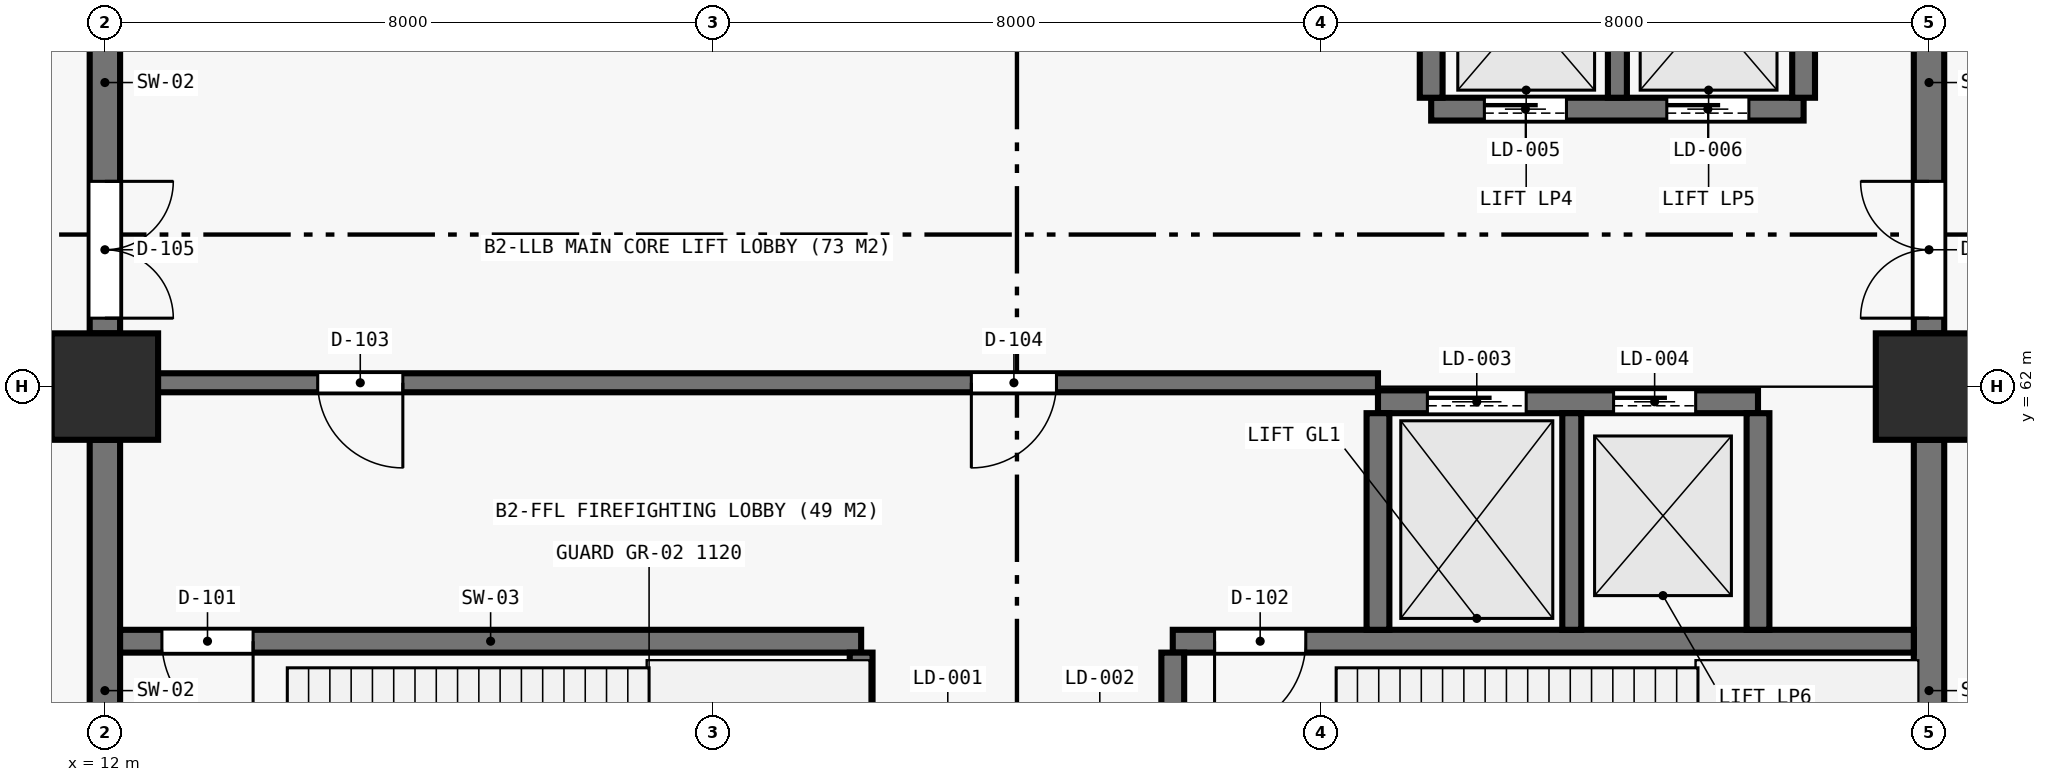
"""IFC4 building model, lengths in metres.
Left out: names, types, materials, properties, quantities, classifications, styles, units other than length and angle.
Written with IfcOpenShell. Run it as: python <this file> out.ifc"""

import sys

from ifc_helpers import new_model, si_unit, direction, frame, frame_2d, origin, origin_2d, place, context, subcontext, project, spatial, rectangle, extrude, element, fill, save


model = new_model("IFC4")
c1 = context("Model", 3, precision=1e-05, world=origin(), true_north=direction((0.0, 1.0)))
c2 = subcontext(c1, "Body", "Model", "MODEL_VIEW")
j1 = project(units=[si_unit("LENGTHUNIT", "METRE"), si_unit("PLANEANGLEUNIT", "RADIAN")], contexts=[c1])
p1 = place(None, origin())
s1 = spatial("IfcSite", under=j1, at=p1, CompositionType="ELEMENT")
p2 = place(p1, origin())
s2 = spatial("IfcBuilding", under=s1, at=p2, CompositionType="ELEMENT")
p3 = place(p2, frame((0.0, 0.0, -12.6)))
s3 = spatial("IfcBuildingStorey", under=s2, at=p3, CompositionType="ELEMENT", Elevation=-12.6)
for number, where, z_axis, x_axis in (
    (1, (12.0, 62.0, 0.0), (0.0, 0.0, 1.0), (1.0, 0.0, 0.0)),
    (2, (36.0, 62.0, 0.0), (0.0, 0.0, 1.0), (1.0, 0.0, 0.0)),
):
    element("IfcColumn", number, at=place(p3, frame(where, z_axis=z_axis, x_axis=x_axis)), inside=s3, PredefinedType="COLUMN", context=c2, shape_type="SweptSolid", body=[
        extrude(rectangle(XDim=1.4, YDim=1.4, at=origin_2d()), origin(), (0.0, 0.0, 1.0), 5.9),
    ])
p4 = place(p3, frame((12.0, 54.7, 0.0), z_axis=(0.0, 0.0, 1.0), x_axis=(0.0, 1.0, 0.0)))
e3 = element("IfcWall", 3, at=p4, inside=s3, PredefinedType="SHEAR", context=c2, shape_type="SweptSolid", body=[
    extrude(rectangle(XDim=6.6, YDim=0.4, at=frame_2d((3.3, 0.0))), origin(), (0.0, 0.0, 1.0), 5.9),
])
p5 = place(p3, frame((12.0, 62.7, 0.0), z_axis=(0.0, 0.0, 1.0), x_axis=(0.0, 1.0, 0.0)))
e4 = element("IfcWall", 4, at=p5, inside=s3, PredefinedType="SHEAR", context=c2, shape_type="SweptSolid", body=[
    extrude(rectangle(XDim=6.6, YDim=0.4, at=frame_2d((3.3, 0.0))), origin(), (0.0, 0.0, 1.0), 5.9),
])
p6 = place(p5, frame((0.2, 0.0, 0.0)))
e5 = element("IfcOpeningElement", 5, at=p6, cuts=e4, PredefinedType="OPENING", context=c2, shape_type="SweptSolid", body=[
    extrude(rectangle(XDim=1.8, YDim=2.2, at=frame_2d((0.9, 1.1))), frame((0.0, 0.21, 0.0), z_axis=(0.0, -1.0, 0.0), x_axis=(1.0, 0.0, 0.0)), (0.0, 0.0, 1.0), 0.42),
])
p7 = place(p3, frame((36.0, 54.7, 0.0), z_axis=(0.0, 0.0, 1.0), x_axis=(0.0, 1.0, 0.0)))
e6 = element("IfcWall", 6, at=p7, inside=s3, PredefinedType="SHEAR", context=c2, shape_type="SweptSolid", body=[
    extrude(rectangle(XDim=6.6, YDim=0.4, at=frame_2d((3.3, 0.0))), origin(), (0.0, 0.0, 1.0), 5.9),
])
p8 = place(p3, frame((36.0, 62.7, 0.0), z_axis=(0.0, 0.0, 1.0), x_axis=(0.0, 1.0, 0.0)))
e7 = element("IfcWall", 7, at=p8, inside=s3, PredefinedType="SHEAR", context=c2, shape_type="SweptSolid", body=[
    extrude(rectangle(XDim=6.6, YDim=0.4, at=frame_2d((3.3, 0.0))), origin(), (0.0, 0.0, 1.0), 5.9),
])
p9 = place(p8, frame((0.2, 0.0, 0.0)))
e8 = element("IfcOpeningElement", 8, at=p9, cuts=e7, PredefinedType="OPENING", context=c2, shape_type="SweptSolid", body=[
    extrude(rectangle(XDim=1.8, YDim=2.2, at=frame_2d((0.9, 1.1))), frame((0.0, 0.21, 0.0), z_axis=(0.0, -1.0, 0.0), x_axis=(1.0, 0.0, 0.0)), (0.0, 0.0, 1.0), 0.42),
])
p10 = place(p3, frame((12.2, 58.65, 0.0), z_axis=(0.0, 0.0, 1.0), x_axis=(1.0, 0.0, 0.0)))
e9 = element("IfcWall", 9, at=p10, inside=s3, PredefinedType="SHEAR", context=c2, shape_type="SweptSolid", body=[
    extrude(rectangle(XDim=9.75, YDim=0.3, at=frame_2d((4.875, 0.0))), origin(), (0.0, 0.0, 1.0), 5.9),
])
p11 = place(p10, frame((0.55, 0.0, 0.0)))
e10 = element("IfcOpeningElement", 10, at=p11, cuts=e9, PredefinedType="OPENING", context=c2, shape_type="SweptSolid", body=[
    extrude(rectangle(XDim=1.2, YDim=2.2, at=frame_2d((0.6, 1.1))), frame((0.0, 0.16, 0.0), z_axis=(0.0, -1.0, 0.0), x_axis=(1.0, 0.0, 0.0)), (0.0, 0.0, 1.0), 0.32),
])
p12 = place(p3, frame((21.95, 54.25, 0.0), z_axis=(0.0, 0.0, 1.0), x_axis=(0.0, 1.0, 0.0)))
e11 = element("IfcWall", 11, at=p12, inside=s3, PredefinedType="SHEAR", context=c2, shape_type="SweptSolid", body=[
    extrude(rectangle(XDim=4.25, YDim=0.3, at=frame_2d((2.125, 0.0))), origin(), (0.0, 0.0, 1.0), 5.9),
])
p13 = place(p3, frame((26.05, 58.65, 0.0), z_axis=(0.0, 0.0, 1.0), x_axis=(1.0, 0.0, 0.0)))
e12 = element("IfcWall", 12, at=p13, inside=s3, PredefinedType="SHEAR", context=c2, shape_type="SweptSolid", body=[
    extrude(rectangle(XDim=9.75, YDim=0.3, at=frame_2d((4.875, 0.0))), origin(), (0.0, 0.0, 1.0), 5.9),
])
p14 = place(p13, frame((0.55, 0.0, 0.0)))
e13 = element("IfcOpeningElement", 13, at=p14, cuts=e12, PredefinedType="OPENING", context=c2, shape_type="SweptSolid", body=[
    extrude(rectangle(XDim=1.2, YDim=2.2, at=frame_2d((0.6, 1.1))), frame((0.0, 0.16, 0.0), z_axis=(0.0, -1.0, 0.0), x_axis=(1.0, 0.0, 0.0)), (0.0, 0.0, 1.0), 0.32),
])
p15 = place(p3, frame((26.05, 54.25, 0.0), z_axis=(0.0, 0.0, 1.0), x_axis=(0.0, 1.0, 0.0)))
e14 = element("IfcWall", 14, at=p15, inside=s3, PredefinedType="SHEAR", context=c2, shape_type="SweptSolid", body=[
    extrude(rectangle(XDim=4.25, YDim=0.3, at=frame_2d((2.125, 0.0))), origin(), (0.0, 0.0, 1.0), 5.9),
])
p16 = place(p3, frame((28.75, 61.8, 0.0), z_axis=(0.0, 0.0, 1.0), x_axis=(1.0, 0.0, 0.0)))
e15 = element("IfcWall", 15, at=p16, inside=s3, PredefinedType="SHEAR", context=c2, shape_type="SweptSolid", body=[
    extrude(rectangle(XDim=5.0, YDim=0.3, at=frame_2d((2.5, 0.0))), origin(), (0.0, 0.0, 1.0), 5.9),
])
p17 = place(p16, frame((0.65, 0.0, 0.0)))
e16 = element("IfcOpeningElement", 16, at=p17, cuts=e15, PredefinedType="OPENING", context=c2, shape_type="SweptSolid", body=[
    extrude(rectangle(XDim=1.3, YDim=2.3, at=frame_2d((0.65, 1.15))), frame((0.0, 0.16, 0.0), z_axis=(0.0, -1.0, 0.0), x_axis=(1.0, 0.0, 0.0)), (0.0, 0.0, 1.0), 0.32),
])
p18 = place(p16, frame((3.1, 0.0, 0.0)))
e17 = element("IfcOpeningElement", 17, at=p18, cuts=e15, PredefinedType="OPENING", context=c2, shape_type="SweptSolid", body=[
    extrude(rectangle(XDim=1.08, YDim=2.2, at=frame_2d((0.54, 1.1))), frame((0.0, 0.16, 0.0), z_axis=(0.0, -1.0, 0.0), x_axis=(1.0, 0.0, 0.0)), (0.0, 0.0, 1.0), 0.32),
])
for number, where, z_axis, x_axis in (
    (18, (28.75, 58.8, 0.0), (0.0, 0.0, 1.0), (0.0, 1.0, 0.0)),
    (19, (33.75, 58.8, 0.0), (0.0, 0.0, 1.0), (0.0, 1.0, 0.0)),
):
    element("IfcWall", number, at=place(p3, frame(where, z_axis=z_axis, x_axis=x_axis)), inside=s3, PredefinedType="SHEAR", context=c2, shape_type="SweptSolid", body=[
        extrude(rectangle(XDim=2.85, YDim=0.3, at=frame_2d((1.425, 0.0))), origin(), (0.0, 0.0, 1.0), 5.9),
    ])
p19 = place(p3, frame((31.3, 58.8, 0.0), z_axis=(0.0, 0.0, 1.0), x_axis=(0.0, 1.0, 0.0)))
e20 = element("IfcWall", 20, at=p19, inside=s3, PredefinedType="SHEAR", context=c2, shape_type="SweptSolid", body=[
    extrude(rectangle(XDim=2.85, YDim=0.25, at=frame_2d((1.425, 0.0))), origin(), (0.0, 0.0, 1.0), 5.9),
])
p20 = place(p3, frame((12.2, 62.05, 0.0), z_axis=(0.0, 0.0, 1.0), x_axis=(1.0, 0.0, 0.0)))
e21 = element("IfcWall", 21, at=p20, inside=s3, PredefinedType="SHEAR", context=c2, shape_type="SweptSolid", body=[
    extrude(rectangle(XDim=16.55, YDim=0.25, at=frame_2d((8.275, 0.0))), origin(), (0.0, 0.0, 1.0), 5.9),
])
p21 = place(p20, frame((2.6, 0.0, 0.0)))
e22 = element("IfcOpeningElement", 22, at=p21, cuts=e21, PredefinedType="OPENING", context=c2, shape_type="SweptSolid", body=[
    extrude(rectangle(XDim=1.12, YDim=2.22, at=frame_2d((0.56, 1.11))), frame((0.0, 0.135, 0.0), z_axis=(0.0, -1.0, 0.0), x_axis=(1.0, 0.0, 0.0)), (0.0, 0.0, 1.0), 0.27),
])
p22 = place(p20, frame((11.2, 0.0, 0.0)))
e23 = element("IfcOpeningElement", 23, at=p22, cuts=e21, PredefinedType="OPENING", context=c2, shape_type="SweptSolid", body=[
    extrude(rectangle(XDim=1.12, YDim=2.22, at=frame_2d((0.56, 1.11))), frame((0.0, 0.135, 0.0), z_axis=(0.0, -1.0, 0.0), x_axis=(1.0, 0.0, 0.0)), (0.0, 0.0, 1.0), 0.27),
])
p23 = place(p3, frame((29.45, 65.65, 0.0), z_axis=(0.0, 0.0, 1.0), x_axis=(1.0, 0.0, 0.0)))
e24 = element("IfcWall", 24, at=p23, inside=s3, PredefinedType="SHEAR", context=c2, shape_type="SweptSolid", body=[
    extrude(rectangle(XDim=4.9, YDim=0.3, at=frame_2d((2.45, 0.0))), origin(), (0.0, 0.0, 1.0), 5.9),
])
p24 = place(p23, frame((0.7, 0.0, 0.0)))
e25 = element("IfcOpeningElement", 25, at=p24, cuts=e24, PredefinedType="OPENING", context=c2, shape_type="SweptSolid", body=[
    extrude(rectangle(XDim=1.08, YDim=2.2, at=frame_2d((0.54, 1.1))), frame((0.0, 0.16, 0.0), z_axis=(0.0, -1.0, 0.0), x_axis=(1.0, 0.0, 0.0)), (0.0, 0.0, 1.0), 0.32),
])
p25 = place(p23, frame((3.1, 0.0, 0.0)))
e26 = element("IfcOpeningElement", 26, at=p25, cuts=e24, PredefinedType="OPENING", context=c2, shape_type="SweptSolid", body=[
    extrude(rectangle(XDim=1.08, YDim=2.2, at=frame_2d((0.54, 1.1))), frame((0.0, 0.16, 0.0), z_axis=(0.0, -1.0, 0.0), x_axis=(1.0, 0.0, 0.0)), (0.0, 0.0, 1.0), 0.32),
])
for number, where, z_axis, x_axis in (
    (27, (29.45, 65.8, 0.0), (0.0, 0.0, 1.0), (0.0, 1.0, 0.0)),
    (28, (34.35, 65.8, 0.0), (0.0, 0.0, 1.0), (0.0, 1.0, 0.0)),
):
    element("IfcWall", number, at=place(p3, frame(where, z_axis=z_axis, x_axis=x_axis)), inside=s3, PredefinedType="SHEAR", context=c2, shape_type="SweptSolid", body=[
        extrude(rectangle(XDim=2.3, YDim=0.3, at=frame_2d((1.15, 0.0))), origin(), (0.0, 0.0, 1.0), 5.9),
    ])
p26 = place(p3, frame((31.9, 65.8, 0.0), z_axis=(0.0, 0.0, 1.0), x_axis=(0.0, 1.0, 0.0)))
e29 = element("IfcWall", 29, at=p26, inside=s3, PredefinedType="SHEAR", context=c2, shape_type="SweptSolid", body=[
    extrude(rectangle(XDim=2.3, YDim=0.25, at=frame_2d((1.15, 0.0))), origin(), (0.0, 0.0, 1.0), 5.9),
])
p27 = place(p11, frame((1.2, 0.0, 0.0), z_axis=(0.0, 0.0, 1.0), x_axis=(-1.0, 0.0, 0.0)))
e30 = element("IfcDoor", 30, at=p27, inside=s3, OperationType="SINGLE_SWING_LEFT", PredefinedType="DOOR", context=c2, shape_type="SweptSolid", body=[
    extrude(rectangle(XDim=1.2, YDim=2.2, at=frame_2d((0.6, 1.1))), frame((0.0, 0.025, 0.0), z_axis=(0.0, -1.0, 0.0), x_axis=(1.0, 0.0, 0.0)), (0.0, 0.0, 1.0), 0.05),
])
fill(e10, e30)
p28 = place(p14, frame((1.2, 0.0, 0.0), z_axis=(0.0, 0.0, 1.0), x_axis=(-1.0, 0.0, 0.0)))
e31 = element("IfcDoor", 31, at=p28, inside=s3, OperationType="SINGLE_SWING_RIGHT", PredefinedType="DOOR", context=c2, shape_type="SweptSolid", body=[
    extrude(rectangle(XDim=1.2, YDim=2.2, at=frame_2d((0.6, 1.1))), frame((0.0, 0.025, 0.0), z_axis=(0.0, -1.0, 0.0), x_axis=(1.0, 0.0, 0.0)), (0.0, 0.0, 1.0), 0.05),
])
fill(e13, e31)
p29 = place(p17, origin())
e32 = element("IfcDoor", 32, at=p29, inside=s3, OperationType="SLIDING_TO_LEFT", PredefinedType="DOOR", context=c2, shape_type="SweptSolid", body=[
    extrude(rectangle(XDim=1.3, YDim=2.3, at=frame_2d((0.65, 1.15))), frame((0.0, 0.025, 0.0), z_axis=(0.0, -1.0, 0.0), x_axis=(1.0, 0.0, 0.0)), (0.0, 0.0, 1.0), 0.05),
])
fill(e16, e32)
p30 = place(p18, origin())
e33 = element("IfcDoor", 33, at=p30, inside=s3, OperationType="SLIDING_TO_LEFT", PredefinedType="DOOR", context=c2, shape_type="SweptSolid", body=[
    extrude(rectangle(XDim=1.08, YDim=2.2, at=frame_2d((0.54, 1.1))), frame((0.0, 0.025, 0.0), z_axis=(0.0, -1.0, 0.0), x_axis=(1.0, 0.0, 0.0)), (0.0, 0.0, 1.0), 0.05),
])
fill(e17, e33)
p31 = place(p24, origin())
e34 = element("IfcDoor", 34, at=p31, inside=s3, OperationType="SLIDING_TO_LEFT", PredefinedType="DOOR", context=c2, shape_type="SweptSolid", body=[
    extrude(rectangle(XDim=1.08, YDim=2.2, at=frame_2d((0.54, 1.1))), frame((0.0, 0.025, 0.0), z_axis=(0.0, -1.0, 0.0), x_axis=(1.0, 0.0, 0.0)), (0.0, 0.0, 1.0), 0.05),
])
fill(e25, e34)
p32 = place(p25, origin())
e35 = element("IfcDoor", 35, at=p32, inside=s3, OperationType="SLIDING_TO_LEFT", PredefinedType="DOOR", context=c2, shape_type="SweptSolid", body=[
    extrude(rectangle(XDim=1.08, YDim=2.2, at=frame_2d((0.54, 1.1))), frame((0.0, 0.025, 0.0), z_axis=(0.0, -1.0, 0.0), x_axis=(1.0, 0.0, 0.0)), (0.0, 0.0, 1.0), 0.05),
])
fill(e26, e35)
p33 = place(p21, frame((1.12, 0.0, 0.0), z_axis=(0.0, 0.0, 1.0), x_axis=(-1.0, 0.0, 0.0)))
e36 = element("IfcDoor", 36, at=p33, inside=s3, OperationType="SINGLE_SWING_LEFT", PredefinedType="DOOR", context=c2, shape_type="SweptSolid", body=[
    extrude(rectangle(XDim=1.12, YDim=2.22, at=frame_2d((0.56, 1.11))), frame((0.0, 0.025, 0.0), z_axis=(0.0, -1.0, 0.0), x_axis=(1.0, 0.0, 0.0)), (0.0, 0.0, 1.0), 0.05),
])
fill(e22, e36)
p34 = place(p22, frame((1.12, 0.0, 0.0), z_axis=(0.0, 0.0, 1.0), x_axis=(-1.0, 0.0, 0.0)))
e37 = element("IfcDoor", 37, at=p34, inside=s3, OperationType="SINGLE_SWING_RIGHT", PredefinedType="DOOR", context=c2, shape_type="SweptSolid", body=[
    extrude(rectangle(XDim=1.12, YDim=2.22, at=frame_2d((0.56, 1.11))), frame((0.0, 0.025, 0.0), z_axis=(0.0, -1.0, 0.0), x_axis=(1.0, 0.0, 0.0)), (0.0, 0.0, 1.0), 0.05),
])
fill(e23, e37)
p35 = place(p6, frame((1.8, 0.0, 0.0), z_axis=(0.0, 0.0, 1.0), x_axis=(-1.0, 0.0, 0.0)))
e38 = element("IfcDoor", 38, at=p35, inside=s3, OperationType="DOUBLE_DOOR_SINGLE_SWING", PredefinedType="DOOR", context=c2, shape_type="SweptSolid", body=[
    extrude(rectangle(XDim=1.8, YDim=2.2, at=frame_2d((0.9, 1.1))), frame((0.0, 0.025, 0.0), z_axis=(0.0, -1.0, 0.0), x_axis=(1.0, 0.0, 0.0)), (0.0, 0.0, 1.0), 0.05),
])
fill(e5, e38)
p36 = place(p9, origin())
e39 = element("IfcDoor", 39, at=p36, inside=s3, OperationType="DOUBLE_DOOR_SINGLE_SWING", PredefinedType="DOOR", context=c2, shape_type="SweptSolid", body=[
    extrude(rectangle(XDim=1.8, YDim=2.2, at=frame_2d((0.9, 1.1))), frame((0.0, 0.025, 0.0), z_axis=(0.0, -1.0, 0.0), x_axis=(1.0, 0.0, 0.0)), (0.0, 0.0, 1.0), 0.05),
])
fill(e8, e39)
save(model, sys.argv[1])
